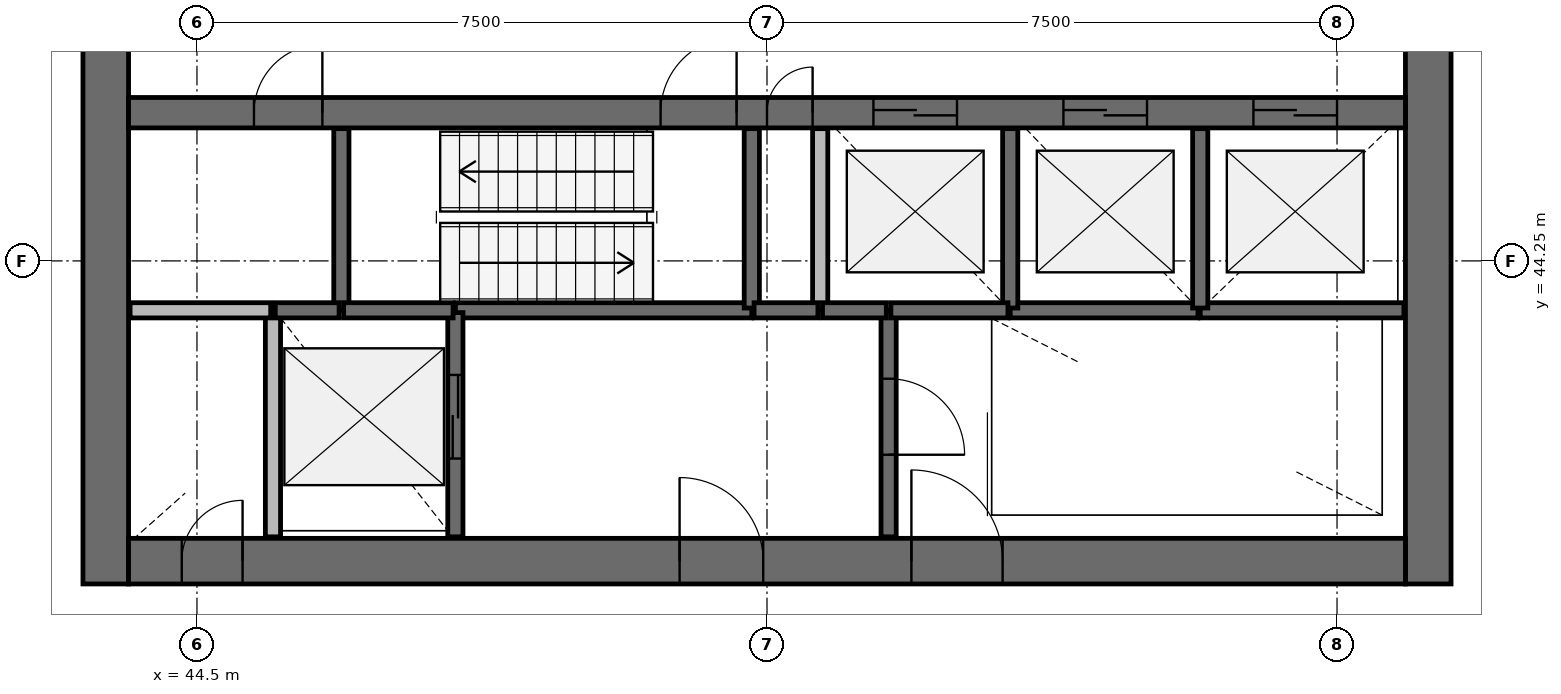
"""IFC4 building model, lengths in metres.
Left out: names, types, materials, properties, quantities, classifications, styles, units other than length and angle.
Written with IfcOpenShell. Run it as: python <this file> out.ifc"""

import sys

from ifc_helpers import new_model, si_unit, direction, frame, frame_2d, origin, place, context, subcontext, project, spatial, rectangle, extrude, source, transform, mapped, element, fill, save


model = new_model("IFC4")
c1 = context("Model", 3, precision=1e-05, world=origin(), true_north=direction((0.0, 1.0)))
c2 = subcontext(c1, "Body", "Model", "MODEL_VIEW")
j1 = project(units=[si_unit("LENGTHUNIT", "METRE"), si_unit("PLANEANGLEUNIT", "RADIAN")], contexts=[c1])
p1 = place(None, origin())
s1 = spatial("IfcSite", under=j1, at=p1, CompositionType="ELEMENT")
p2 = place(p1, origin())
s2 = spatial("IfcBuilding", under=s1, at=p2, CompositionType="ELEMENT")
p3 = place(p2, frame((0.0, 0.0, 265.7)))
s3 = spatial("IfcBuildingStorey", under=s2, at=p3, CompositionType="ELEMENT", Elevation=265.7)
p4 = place(p3, frame((60.7, 40.0, 0.0), z_axis=(0.0, 0.0, 1.0), x_axis=(0.0, 1.0, 0.0)))
e1 = element("IfcWall", 1, at=p4, inside=s3, PredefinedType="SHEAR", context=c2, shape_type="SweptSolid", body=[
    extrude(rectangle(XDim=16.0, YDim=0.6, at=frame_2d((8.0, 0.0))), origin(), (0.0, 0.0, 1.0), 3.9),
])
p5 = place(p4, frame((7.1, 0.0, 0.0)))
e2 = element("IfcOpeningElement", 2, at=p5, cuts=e1, PredefinedType="OPENING", context=c2, shape_type="SweptSolid", body=[
    extrude(rectangle(XDim=1.8, YDim=2.1, at=frame_2d((0.9, 1.05))), frame((0.0, 0.31, 0.0), z_axis=(0.0, -1.0, 0.0), x_axis=(1.0, 0.0, 0.0)), (0.0, 0.0, 1.0), 0.62),
])
p6 = place(p3, frame((43.3, 56.0, 0.0), z_axis=(0.0, 0.0, 1.0), x_axis=(0.0, -1.0, 0.0)))
e3 = element("IfcWall", 3, at=p6, inside=s3, PredefinedType="SHEAR", context=c2, shape_type="SweptSolid", body=[
    extrude(rectangle(XDim=16.0, YDim=0.6, at=frame_2d((8.0, 0.0))), origin(), (0.0, 0.0, 1.0), 3.9),
])
p7 = place(p6, frame((7.1, 0.0, 0.0)))
e4 = element("IfcOpeningElement", 4, at=p7, cuts=e3, PredefinedType="OPENING", context=c2, shape_type="SweptSolid", body=[
    extrude(rectangle(XDim=1.8, YDim=2.1, at=frame_2d((0.9, 1.05))), frame((0.0, 0.31, 0.0), z_axis=(0.0, -1.0, 0.0), x_axis=(1.0, 0.0, 0.0)), (0.0, 0.0, 1.0), 0.62),
])
p8 = place(p3, frame((43.6, 40.3, 0.0), z_axis=(0.0, 0.0, 1.0), x_axis=(1.0, 0.0, 0.0)))
e5 = element("IfcWall", 5, at=p8, inside=s3, PredefinedType="SHEAR", context=c2, shape_type="SweptSolid", body=[
    extrude(rectangle(XDim=16.8, YDim=0.6, at=frame_2d((8.4, 0.0))), origin(), (0.0, 0.0, 1.0), 3.9),
])
p9 = place(p8, frame((10.3, 0.0, 0.0)))
e6 = element("IfcOpeningElement", 6, at=p9, cuts=e5, PredefinedType="OPENING", context=c2, shape_type="SweptSolid", body=[
    extrude(rectangle(XDim=1.2, YDim=2.1, at=frame_2d((0.6, 1.05))), frame((0.0, 0.31, 0.0), z_axis=(0.0, -1.0, 0.0), x_axis=(1.0, 0.0, 0.0)), (0.0, 0.0, 1.0), 0.62),
])
p10 = place(p8, frame((7.25, 0.0, 0.0)))
e7 = element("IfcOpeningElement", 7, at=p10, cuts=e5, PredefinedType="OPENING", context=c2, shape_type="SweptSolid", body=[
    extrude(rectangle(XDim=1.1, YDim=2.1, at=frame_2d((0.55, 1.05))), frame((0.0, 0.31, 0.0), z_axis=(0.0, -1.0, 0.0), x_axis=(1.0, 0.0, 0.0)), (0.0, 0.0, 1.0), 0.62),
])
p11 = place(p8, frame((0.7, 0.0, 0.0)))
e8 = element("IfcOpeningElement", 8, at=p11, cuts=e5, PredefinedType="OPENING", context=c2, shape_type="SweptSolid", body=[
    extrude(rectangle(XDim=0.8, YDim=2.1, at=frame_2d((0.4, 1.05))), frame((0.0, 0.31, 0.0), z_axis=(0.0, -1.0, 0.0), x_axis=(1.0, 0.0, 0.0)), (0.0, 0.0, 1.0), 0.62),
])
p12 = place(p3, frame((43.6, 46.2, 0.0), z_axis=(0.0, 0.0, 1.0), x_axis=(1.0, 0.0, 0.0)))
e9 = element("IfcWall", 9, at=p12, inside=s3, PredefinedType="SHEAR", context=c2, shape_type="SweptSolid", body=[
    extrude(rectangle(XDim=16.8, YDim=0.4, at=frame_2d((8.4, 0.0))), origin(), (0.0, 0.0, 1.0), 3.9),
])
p13 = place(p12, frame((9.8, 0.0, 0.0)))
e10 = element("IfcOpeningElement", 10, at=p13, cuts=e9, PredefinedType="OPENING", context=c2, shape_type="SweptSolid", body=[
    extrude(rectangle(XDim=1.1, YDim=2.1, at=frame_2d((0.55, 1.05))), frame((0.0, 0.21, 0.0), z_axis=(0.0, -1.0, 0.0), x_axis=(1.0, 0.0, 0.0)), (0.0, 0.0, 1.0), 0.42),
])
p14 = place(p12, frame((12.3, 0.0, 0.0)))
e11 = element("IfcOpeningElement", 11, at=p14, cuts=e9, PredefinedType="OPENING", context=c2, shape_type="SweptSolid", body=[
    extrude(rectangle(XDim=1.1, YDim=2.1, at=frame_2d((0.55, 1.05))), frame((0.0, 0.21, 0.0), z_axis=(0.0, -1.0, 0.0), x_axis=(1.0, 0.0, 0.0)), (0.0, 0.0, 1.0), 0.42),
])
p15 = place(p12, frame((14.8, 0.0, 0.0)))
e12 = element("IfcOpeningElement", 12, at=p15, cuts=e9, PredefinedType="OPENING", context=c2, shape_type="SweptSolid", body=[
    extrude(rectangle(XDim=1.1, YDim=2.1, at=frame_2d((0.55, 1.05))), frame((0.0, 0.21, 0.0), z_axis=(0.0, -1.0, 0.0), x_axis=(1.0, 0.0, 0.0)), (0.0, 0.0, 1.0), 0.42),
])
p16 = place(p12, frame((7.0, 0.0, 0.0)))
e13 = element("IfcOpeningElement", 13, at=p16, cuts=e9, PredefinedType="OPENING", context=c2, shape_type="SweptSolid", body=[
    extrude(rectangle(XDim=1.0, YDim=2.1, at=frame_2d((0.5, 1.05))), frame((0.0, 0.21, 0.0), z_axis=(0.0, -1.0, 0.0), x_axis=(1.0, 0.0, 0.0)), (0.0, 0.0, 1.0), 0.42),
])
p17 = place(p12, frame((8.4, 0.0, 0.0)))
e14 = element("IfcOpeningElement", 14, at=p17, cuts=e9, PredefinedType="OPENING", context=c2, shape_type="SweptSolid", body=[
    extrude(rectangle(XDim=0.6, YDim=2.1, at=frame_2d((0.3, 1.05))), frame((0.0, 0.21, 0.0), z_axis=(0.0, -1.0, 0.0), x_axis=(1.0, 0.0, 0.0)), (0.0, 0.0, 1.0), 0.42),
])
p18 = place(p12, frame((1.65, 0.0, 0.0)))
e15 = element("IfcOpeningElement", 15, at=p18, cuts=e9, PredefinedType="OPENING", context=c2, shape_type="SweptSolid", body=[
    extrude(rectangle(XDim=0.9, YDim=2.1, at=frame_2d((0.45, 1.05))), frame((0.0, 0.21, 0.0), z_axis=(0.0, -1.0, 0.0), x_axis=(1.0, 0.0, 0.0)), (0.0, 0.0, 1.0), 0.42),
])
p19 = place(p3, frame((51.8, 43.6, 0.0), z_axis=(0.0, 0.0, 1.0), x_axis=(-1.0, 0.0, 0.0)))
e16 = element("IfcWall", 16, at=p19, inside=s3, PredefinedType="SOLIDWALL", context=c2, shape_type="SweptSolid", body=[
    extrude(rectangle(XDim=3.9, YDim=0.2, at=frame_2d((1.95, 0.0))), origin(), (0.0, 0.0, 1.0), 3.62),
])
p20 = place(p3, frame((45.5, 43.6, 0.0), z_axis=(0.0, 0.0, 1.0), x_axis=(0.0, -1.0, 0.0)))
e17 = element("IfcWall", 17, at=p20, inside=s3, PredefinedType="SOLIDWALL", context=c2, shape_type="SweptSolid", body=[
    extrude(rectangle(XDim=2.98, YDim=0.2, at=frame_2d((1.49, 0.0))), origin(), (0.0, 0.0, 1.0), 2.7),
])
p21 = place(p3, frame((47.9, 40.62, 0.0), z_axis=(0.0, 0.0, 1.0), x_axis=(0.0, 1.0, 0.0)))
e18 = element("IfcWall", 18, at=p21, inside=s3, PredefinedType="SOLIDWALL", context=c2, shape_type="SweptSolid", body=[
    extrude(rectangle(XDim=2.95, YDim=0.2, at=frame_2d((1.475, 0.0))), origin(), (0.0, 0.0, 1.0), 2.7),
])
p22 = place(p21, frame((1.03, 0.0, 0.0)))
e19 = element("IfcOpeningElement", 19, at=p22, cuts=e18, PredefinedType="OPENING", context=c2, shape_type="SweptSolid", body=[
    extrude(rectangle(XDim=1.1, YDim=2.1, at=frame_2d((0.55, 1.05))), frame((0.0, 0.11, 0.0), z_axis=(0.0, -1.0, 0.0), x_axis=(1.0, 0.0, 0.0)), (0.0, 0.0, 1.0), 0.22),
])
p23 = place(p3, frame((53.6, 43.6, 0.0), z_axis=(0.0, 0.0, 1.0), x_axis=(0.0, -1.0, 0.0)))
e20 = element("IfcWall", 20, at=p23, inside=s3, PredefinedType="SOLIDWALL", context=c2, shape_type="SweptSolid", body=[
    extrude(rectangle(XDim=2.98, YDim=0.2, at=frame_2d((1.49, 0.0))), origin(), (0.0, 0.0, 1.0), 2.7),
])
p24 = place(p23, frame((0.9, 0.0, 0.0)))
e21 = element("IfcOpeningElement", 21, at=p24, cuts=e20, PredefinedType="OPENING", context=c2, shape_type="SweptSolid", body=[
    extrude(rectangle(XDim=1.0, YDim=2.1, at=frame_2d((0.5, 1.05))), frame((0.0, 0.11, 0.0), z_axis=(0.0, -1.0, 0.0), x_axis=(1.0, 0.0, 0.0)), (0.0, 0.0, 1.0), 0.22),
])
p25 = place(p3, frame((57.7, 43.6, 0.0), z_axis=(0.0, 0.0, 1.0), x_axis=(1.0, 0.0, 0.0)))
e22 = element("IfcWall", 22, at=p25, inside=s3, PredefinedType="SOLIDWALL", context=c2, shape_type="SweptSolid", body=[
    extrude(rectangle(XDim=2.68, YDim=0.2, at=frame_2d((1.34, 0.0))), origin(), (0.0, 0.0, 1.0), 2.7),
])
p26 = place(p3, frame((55.2, 43.6, 0.0), z_axis=(0.0, 0.0, 1.0), x_axis=(1.0, 0.0, 0.0)))
e23 = element("IfcWall", 23, at=p26, inside=s3, PredefinedType="SOLIDWALL", context=c2, shape_type="SweptSolid", body=[
    extrude(rectangle(XDim=2.47, YDim=0.2, at=frame_2d((1.235, 0.0))), origin(), (0.0, 0.0, 1.0), 3.62),
])
p27 = place(p3, frame((46.4, 45.99, 0.0), z_axis=(0.0, 0.0, 1.0), x_axis=(0.0, -1.0, 0.0)))
e24 = element("IfcWall", 24, at=p27, inside=s3, PredefinedType="SOLIDWALL", context=c2, shape_type="SweptSolid", body=[
    extrude(rectangle(XDim=2.39, YDim=0.2, at=frame_2d((1.195, 0.0))), origin(), (0.0, 0.0, 1.0), 3.62),
])
p28 = place(p3, frame((51.8, 43.63, 0.0), z_axis=(0.0, 0.0, 1.0), x_axis=(0.0, 1.0, 0.0)))
e25 = element("IfcWall", 25, at=p28, inside=s3, PredefinedType="SOLIDWALL", context=c2, shape_type="SweptSolid", body=[
    extrude(rectangle(XDim=2.36, YDim=0.2, at=frame_2d((1.18, 0.0))), origin(), (0.0, 0.0, 1.0), 3.62),
])
p29 = place(p3, frame((52.7, 45.99, 0.0), z_axis=(0.0, 0.0, 1.0), x_axis=(0.0, -1.0, 0.0)))
e26 = element("IfcWall", 26, at=p29, inside=s3, PredefinedType="SOLIDWALL", context=c2, shape_type="SweptSolid", body=[
    extrude(rectangle(XDim=2.39, YDim=0.2, at=frame_2d((1.195, 0.0))), origin(), (0.0, 0.0, 1.0), 3.62),
])
for number, where, z_axis, x_axis in (
    (27, (55.2, 43.63, 0.0), (0.0, 0.0, 1.0), (0.0, 1.0, 0.0)),
    (28, (57.7, 43.63, 0.0), (0.0, 0.0, 1.0), (0.0, 1.0, 0.0)),
):
    element("IfcWall", number, at=place(p3, frame(where, z_axis=z_axis, x_axis=x_axis)), inside=s3, PredefinedType="SOLIDWALL", context=c2, shape_type="SweptSolid", body=[
        extrude(rectangle(XDim=2.36, YDim=0.2, at=frame_2d((1.18, 0.0))), origin(), (0.0, 0.0, 1.0), 3.62),
    ])
p30 = place(p3, frame((45.47, 43.6, 0.0), z_axis=(0.0, 0.0, 1.0), x_axis=(-1.0, 0.0, 0.0)))
e29 = element("IfcWall", 29, at=p30, inside=s3, PredefinedType="SOLIDWALL", context=c2, shape_type="SweptSolid", body=[
    extrude(rectangle(XDim=1.85, YDim=0.2, at=frame_2d((0.925, 0.0))), origin(), (0.0, 0.0, 1.0), 2.7),
])
p31 = place(p3, frame((53.63, 43.6, 0.0), z_axis=(0.0, 0.0, 1.0), x_axis=(1.0, 0.0, 0.0)))
e30 = element("IfcWall", 30, at=p31, inside=s3, PredefinedType="SOLIDWALL", context=c2, shape_type="SweptSolid", body=[
    extrude(rectangle(XDim=1.54, YDim=0.2, at=frame_2d((0.77, 0.0))), origin(), (0.0, 0.0, 1.0), 3.62),
])
p32 = place(p3, frame((47.87, 43.6, 0.0), z_axis=(0.0, 0.0, 1.0), x_axis=(-1.0, 0.0, 0.0)))
e31 = element("IfcWall", 31, at=p32, inside=s3, PredefinedType="SOLIDWALL", context=c2, shape_type="SweptSolid", body=[
    extrude(rectangle(XDim=1.44, YDim=0.2, at=frame_2d((0.72, 0.0))), origin(), (0.0, 0.0, 1.0), 3.62),
])
p33 = place(p3, frame((52.67, 43.6, 0.0), z_axis=(0.0, 0.0, 1.0), x_axis=(-1.0, 0.0, 0.0)))
e32 = element("IfcWall", 32, at=p33, inside=s3, PredefinedType="SOLIDWALL", context=c2, shape_type="SweptSolid", body=[
    extrude(rectangle(XDim=0.84, YDim=0.2, at=frame_2d((0.42, 0.0))), origin(), (0.0, 0.0, 1.0), 3.62),
])
p34 = place(p3, frame((46.37, 43.6, 0.0), z_axis=(0.0, 0.0, 1.0), x_axis=(-1.0, 0.0, 0.0)))
e33 = element("IfcWall", 33, at=p34, inside=s3, PredefinedType="SOLIDWALL", context=c2, shape_type="SweptSolid", body=[
    extrude(rectangle(XDim=0.84, YDim=0.2, at=frame_2d((0.42, 0.0))), origin(), (0.0, 0.0, 1.0), 2.7),
])
p35 = place(p3, frame((52.73, 43.6, 0.0), z_axis=(0.0, 0.0, 1.0), x_axis=(1.0, 0.0, 0.0)))
e34 = element("IfcWall", 34, at=p35, inside=s3, PredefinedType="SOLIDWALL", context=c2, shape_type="SweptSolid", body=[
    extrude(rectangle(XDim=0.84, YDim=0.2, at=frame_2d((0.42, 0.0))), origin(), (0.0, 0.0, 1.0), 3.62),
])
m1 = source(origin(), c2, "Body", "SweptSolid", [
    extrude(rectangle(XDim=1.1, YDim=2.1, at=frame_2d((0.55, 1.05))), frame((0.0, 0.025, 0.0), z_axis=(0.0, -1.0, 0.0), x_axis=(1.0, 0.0, 0.0)), (0.0, 0.0, 1.0), 0.05),
])
p36 = place(p13, origin())
e35 = element("IfcDoor", 35, at=p36, inside=s3, OperationType="DOUBLE_DOOR_SLIDING", PredefinedType="USERDEFINED", context=c2, shape_type="MappedRepresentation", body=[
    mapped(m1, transform((0.0, 0.0, 0.0), scale=1.0)),
])
fill(e10, e35)
p37 = place(p14, origin())
e36 = element("IfcDoor", 36, at=p37, inside=s3, OperationType="DOUBLE_DOOR_SLIDING", PredefinedType="USERDEFINED", context=c2, shape_type="MappedRepresentation", body=[
    mapped(m1, transform((0.0, 0.0, 0.0), scale=1.0)),
])
fill(e11, e36)
p38 = place(p15, origin())
e37 = element("IfcDoor", 37, at=p38, inside=s3, OperationType="DOUBLE_DOOR_SLIDING", PredefinedType="USERDEFINED", context=c2, shape_type="MappedRepresentation", body=[
    mapped(m1, transform((0.0, 0.0, 0.0), scale=1.0)),
])
fill(e12, e37)
p39 = place(p22, origin())
e38 = element("IfcDoor", 38, at=p39, inside=s3, OperationType="DOUBLE_DOOR_SLIDING", PredefinedType="USERDEFINED", context=c2, shape_type="MappedRepresentation", body=[
    mapped(m1, transform((0.0, 0.0, 0.0), scale=1.0)),
])
fill(e19, e38)
m2 = source(origin(), c2, "Body", "SweptSolid", [
    extrude(rectangle(XDim=1.2, YDim=2.1, at=frame_2d((0.6, 1.05))), frame((0.0, 0.025, 0.0), z_axis=(0.0, -1.0, 0.0), x_axis=(1.0, 0.0, 0.0)), (0.0, 0.0, 1.0), 0.05),
])
p40 = place(p9, origin())
e39 = element("IfcDoor", 39, at=p40, inside=s3, OperationType="SINGLE_SWING_LEFT", PredefinedType="DOOR", context=c2, shape_type="MappedRepresentation", body=[
    mapped(m2, transform((0.0, 0.0, 0.0), scale=1.0)),
])
fill(e6, e39)
m3 = source(origin(), c2, "Body", "SweptSolid", [
    extrude(rectangle(XDim=1.0, YDim=2.1, at=frame_2d((0.5, 1.05))), frame((0.0, 0.025, 0.0), z_axis=(0.0, -1.0, 0.0), x_axis=(1.0, 0.0, 0.0)), (0.0, 0.0, 1.0), 0.05),
])
p41 = place(p24, origin())
e40 = element("IfcDoor", 40, at=p41, inside=s3, OperationType="SINGLE_SWING_RIGHT", PredefinedType="DOOR", context=c2, shape_type="MappedRepresentation", body=[
    mapped(m3, transform((0.0, 0.0, 0.0), scale=1.0)),
])
fill(e21, e40)
m4 = source(origin(), c2, "Body", "SweptSolid", [
    extrude(rectangle(XDim=1.1, YDim=2.1, at=frame_2d((0.55, 1.05))), frame((0.0, 0.025, 0.0), z_axis=(0.0, -1.0, 0.0), x_axis=(1.0, 0.0, 0.0)), (0.0, 0.0, 1.0), 0.05),
])
p42 = place(p10, origin())
e41 = element("IfcDoor", 41, at=p42, inside=s3, OperationType="SINGLE_SWING_LEFT", PredefinedType="DOOR", context=c2, shape_type="MappedRepresentation", body=[
    mapped(m4, transform((0.0, 0.0, 0.0), scale=1.0)),
])
fill(e7, e41)
m5 = source(origin(), c2, "Body", "SweptSolid", [
    extrude(rectangle(XDim=0.8, YDim=2.1, at=frame_2d((0.4, 1.05))), frame((0.0, 0.025, 0.0), z_axis=(0.0, -1.0, 0.0), x_axis=(1.0, 0.0, 0.0)), (0.0, 0.0, 1.0), 0.05),
])
p43 = place(p11, origin())
e42 = element("IfcDoor", 42, at=p43, inside=s3, OperationType="SINGLE_SWING_RIGHT", PredefinedType="DOOR", context=c2, shape_type="MappedRepresentation", body=[
    mapped(m5, transform((0.0, 0.0, 0.0), scale=1.0)),
])
fill(e8, e42)
p44 = place(p16, origin())
e43 = element("IfcDoor", 43, at=p44, inside=s3, OperationType="SINGLE_SWING_RIGHT", PredefinedType="DOOR", context=c2, shape_type="MappedRepresentation", body=[
    mapped(m3, transform((0.0, 0.0, 0.0), scale=1.0)),
])
fill(e13, e43)
m6 = source(origin(), c2, "Body", "SweptSolid", [
    extrude(rectangle(XDim=0.6, YDim=2.1, at=frame_2d((0.3, 1.05))), frame((0.0, 0.025, 0.0), z_axis=(0.0, -1.0, 0.0), x_axis=(1.0, 0.0, 0.0)), (0.0, 0.0, 1.0), 0.05),
])
p45 = place(p17, origin())
e44 = element("IfcDoor", 44, at=p45, inside=s3, OperationType="SINGLE_SWING_RIGHT", PredefinedType="DOOR", context=c2, shape_type="MappedRepresentation", body=[
    mapped(m6, transform((0.0, 0.0, 0.0), scale=1.0)),
])
fill(e14, e44)
m7 = source(origin(), c2, "Body", "SweptSolid", [
    extrude(rectangle(XDim=0.9, YDim=2.1, at=frame_2d((0.45, 1.05))), frame((0.0, 0.025, 0.0), z_axis=(0.0, -1.0, 0.0), x_axis=(1.0, 0.0, 0.0)), (0.0, 0.0, 1.0), 0.05),
])
p46 = place(p18, origin())
e45 = element("IfcDoor", 45, at=p46, inside=s3, OperationType="SINGLE_SWING_RIGHT", PredefinedType="DOOR", context=c2, shape_type="MappedRepresentation", body=[
    mapped(m7, transform((0.0, 0.0, 0.0), scale=1.0)),
])
fill(e15, e45)
save(model, sys.argv[1])
